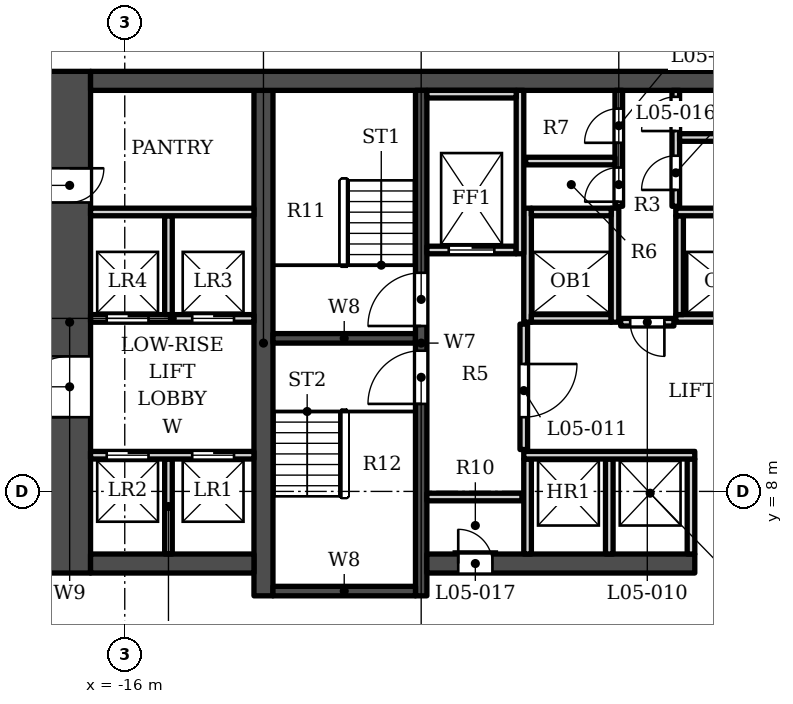
"""IFC4 building model, lengths in metres.
Left out: names, types, materials, properties, quantities, classifications, styles, units other than length and angle.
Written with IfcOpenShell. Run it as: python <this file> out.ifc"""

import sys

from ifc_helpers import new_model, si_unit, direction, frame, frame_2d, origin, place, context, subcontext, project, spatial, rectangle, extrude, element, fill, save


model = new_model("IFC4")
c1 = context("Model", 3, precision=1e-05, world=origin(), true_north=direction((0.0, 1.0)))
c2 = subcontext(c1, "Body", "Model", "MODEL_VIEW")
j1 = project(units=[si_unit("LENGTHUNIT", "METRE"), si_unit("PLANEANGLEUNIT", "RADIAN")], contexts=[c1])
p1 = place(None, origin())
s1 = spatial("IfcSite", under=j1, at=p1, CompositionType="ELEMENT")
p2 = place(p1, origin())
s2 = spatial("IfcBuilding", under=s1, at=p2, CompositionType="ELEMENT")
p3 = place(p2, frame((0.0, 0.0, 40.0)))
s3 = spatial("IfcBuildingStorey", under=s2, at=p3, CompositionType="ELEMENT", Elevation=40.0)
p4 = place(p3, frame((-16.9, 18.802, 0.0), z_axis=(0.0, 0.0, 1.0), x_axis=(1.0, 0.0, 0.0)))
e1 = element("IfcWall", 1, at=p4, inside=s3, PredefinedType="SHEAR", context=c2, shape_type="SweptSolid", body=[
    extrude(rectangle(XDim=33.8, YDim=0.5, at=frame_2d((16.9, 0.0))), origin(), (0.0, 0.0, 1.0), 6.0),
])
p5 = place(p3, frame((-12.35, 5.253, 0.0), z_axis=(0.0, 0.0, 1.0), x_axis=(0.0, 1.0, 0.0)))
e2 = element("IfcWall", 2, at=p5, inside=s3, PredefinedType="SHEAR", context=c2, shape_type="SweptSolid", body=[
    extrude(rectangle(XDim=13.3, YDim=0.5, at=frame_2d((6.65, 0.0))), origin(), (0.0, 0.0, 1.0), 6.0),
])
p6 = place(p3, frame((-8.2, 5.253, 0.0), z_axis=(0.0, 0.0, 1.0), x_axis=(0.0, 1.0, 0.0)))
e3 = element("IfcWall", 3, at=p6, inside=s3, PredefinedType="SHEAR", context=c2, shape_type="SweptSolid", body=[
    extrude(rectangle(XDim=13.3, YDim=0.3, at=frame_2d((6.65, 0.0))), origin(), (0.0, 0.0, 1.0), 6.0),
])
p7 = place(p6, frame((7.1, 0.0, 0.0)))
e4 = element("IfcOpeningElement", 4, at=p7, cuts=e3, PredefinedType="OPENING", context=c2, shape_type="SweptSolid", body=[
    extrude(rectangle(XDim=1.4, YDim=2.1, at=frame_2d((0.7, 1.05))), frame((0.0, 0.16, 0.0), z_axis=(0.0, -1.0, 0.0), x_axis=(1.0, 0.0, 0.0)), (0.0, 0.0, 1.0), 0.32),
])
p8 = place(p6, frame((5.05, 0.0, 0.0)))
e5 = element("IfcOpeningElement", 5, at=p8, cuts=e3, PredefinedType="OPENING", context=c2, shape_type="SweptSolid", body=[
    extrude(rectangle(XDim=1.4, YDim=2.1, at=frame_2d((0.7, 1.05))), frame((0.0, 0.16, 0.0), z_axis=(0.0, -1.0, 0.0), x_axis=(1.0, 0.0, 0.0)), (0.0, 0.0, 1.0), 0.32),
])
for number, where, z_axis, x_axis in (
    (6, (-12.1, 12.028, 0.0), (0.0, 0.0, 1.0), (1.0, 0.0, 0.0)),
    (7, (-12.1, 5.378, 0.0), (0.0, 0.0, 1.0), (1.0, 0.0, 0.0)),
):
    element("IfcWall", number, at=place(p3, frame(where, z_axis=z_axis, x_axis=x_axis)), inside=s3, PredefinedType="SHEAR", context=c2, shape_type="SweptSolid", body=[
        extrude(rectangle(XDim=3.75, YDim=0.25, at=frame_2d((1.875, 0.0))), origin(), (0.0, 0.0, 1.0), 6.0),
    ])
p9 = place(p3, frame((-8.05, 6.103, 0.0), z_axis=(0.0, 0.0, 1.0), x_axis=(1.0, 0.0, 0.0)))
e8 = element("IfcWall", 8, at=p9, inside=s3, PredefinedType="SHEAR", context=c2, shape_type="SweptSolid", body=[
    extrude(rectangle(XDim=7.05, YDim=0.5, at=frame_2d((3.525, 0.0))), origin(), (0.0, 0.0, 1.0), 6.0),
])
p10 = place(p9, frame((0.825, 0.0, 0.0)))
e9 = element("IfcOpeningElement", 9, at=p10, cuts=e8, PredefinedType="OPENING", context=c2, shape_type="SweptSolid", body=[
    extrude(rectangle(XDim=0.9, YDim=2.1, at=frame_2d((0.45, 1.05))), frame((0.0, 0.26, 0.0), z_axis=(0.0, -1.0, 0.0), x_axis=(1.0, 0.0, 0.0)), (0.0, 0.0, 1.0), 0.52),
])
p11 = place(p3, frame((-12.6, 6.103, 0.0), z_axis=(0.0, 0.0, 1.0), x_axis=(-1.0, 0.0, 0.0)))
e10 = element("IfcWall", 10, at=p11, inside=s3, PredefinedType="SHEAR", context=c2, shape_type="SweptSolid", body=[
    extrude(rectangle(XDim=4.3, YDim=0.5, at=frame_2d((2.15, 0.0))), origin(), (0.0, 0.0, 1.0), 6.0),
])
p12 = place(p3, frame((-17.45, 5.853, 0.0), z_axis=(0.0, 0.0, 1.0), x_axis=(0.0, 1.0, 0.0)))
e11 = element("IfcWall", 11, at=p12, inside=s3, PredefinedType="SHEAR", context=c2, shape_type="SweptSolid", body=[
    extrude(rectangle(XDim=13.2, YDim=1.1, at=frame_2d((6.6, 0.0))), origin(), (0.0, 0.0, 1.0), 6.0),
])
p13 = place(p12, frame((4.1, 0.0, 0.0)))
e12 = element("IfcOpeningElement", 12, at=p13, cuts=e11, PredefinedType="OPENING", context=c2, shape_type="SweptSolid", body=[
    extrude(rectangle(XDim=1.6, YDim=2.1, at=frame_2d((0.8, 1.05))), frame((0.0, 0.56, 0.0), z_axis=(0.0, -1.0, 0.0), x_axis=(1.0, 0.0, 0.0)), (0.0, 0.0, 1.0), 1.12),
])
p14 = place(p12, frame((9.75, 0.0, 0.0)))
e13 = element("IfcOpeningElement", 13, at=p14, cuts=e11, PredefinedType="OPENING", context=c2, shape_type="SweptSolid", body=[
    extrude(rectangle(XDim=0.9, YDim=2.1, at=frame_2d((0.45, 1.05))), frame((0.0, 0.56, 0.0), z_axis=(0.0, -1.0, 0.0), x_axis=(1.0, 0.0, 0.0)), (0.0, 0.0, 1.0), 1.12),
])
for number, where, z_axis, x_axis in (
    (14, (-14.85, 6.353, 0.0), (0.0, 0.0, 1.0), (0.0, 1.0, 0.0)),
    (15, (-5.4, 6.353, 0.0), (0.0, 0.0, 1.0), (0.0, 1.0, 0.0)),
    (16, (-3.25, 6.353, 0.0), (0.0, 0.0, 1.0), (0.0, 1.0, 0.0)),
    (17, (-1.1, 6.353, 0.0), (0.0, 0.0, 1.0), (0.0, 1.0, 0.0)),
    (18, (-8.05, 7.853, 0.0), (0.0, 0.0, 1.0), (1.0, 0.0, 0.0)),
):
    element("IfcWall", number, at=place(p3, frame(where, z_axis=z_axis, x_axis=x_axis)), inside=s3, PredefinedType="SOLIDWALL", context=c2, shape_type="SweptSolid", body=[
        extrude(rectangle(XDim=2.5, YDim=0.2, at=frame_2d((1.25, 0.0))), origin(), (0.0, 0.0, 1.0), 5.55),
    ])
p15 = place(p3, frame((-16.9, 8.953, 0.0), z_axis=(0.0, 0.0, 1.0), x_axis=(1.0, 0.0, 0.0)))
e19 = element("IfcWall", 19, at=p15, inside=s3, PredefinedType="SOLIDWALL", context=c2, shape_type="SweptSolid", body=[
    extrude(rectangle(XDim=4.3, YDim=0.2, at=frame_2d((2.15, 0.0))), origin(), (0.0, 0.0, 1.0), 5.55),
])
p16 = place(p15, frame((2.675, 0.0, 0.0)))
e20 = element("IfcOpeningElement", 20, at=p16, cuts=e19, PredefinedType="OPENING", context=c2, shape_type="SweptSolid", body=[
    extrude(rectangle(XDim=1.1, YDim=2.1, at=frame_2d((0.55, 1.05))), frame((0.0, 0.11, 0.0), z_axis=(0.0, -1.0, 0.0), x_axis=(1.0, 0.0, 0.0)), (0.0, 0.0, 1.0), 0.22),
])
p17 = place(p15, frame((0.425, 0.0, 0.0)))
e21 = element("IfcOpeningElement", 21, at=p17, cuts=e19, PredefinedType="OPENING", context=c2, shape_type="SweptSolid", body=[
    extrude(rectangle(XDim=1.1, YDim=2.1, at=frame_2d((0.55, 1.05))), frame((0.0, 0.11, 0.0), z_axis=(0.0, -1.0, 0.0), x_axis=(1.0, 0.0, 0.0)), (0.0, 0.0, 1.0), 0.22),
])
p18 = place(p3, frame((-5.5, 8.953, 0.0), z_axis=(0.0, 0.0, 1.0), x_axis=(1.0, 0.0, 0.0)))
e22 = element("IfcWall", 22, at=p18, inside=s3, PredefinedType="SOLIDWALL", context=c2, shape_type="SweptSolid", body=[
    extrude(rectangle(XDim=4.5, YDim=0.2, at=frame_2d((2.25, 0.0))), origin(), (0.0, 0.0, 1.0), 5.55),
])
p19 = place(p3, frame((-5.5, 9.103, 0.0), z_axis=(0.0, 0.0, 1.0), x_axis=(0.0, 1.0, 0.0)))
e23 = element("IfcWall", 23, at=p19, inside=s3, PredefinedType="SOLIDWALL", context=c2, shape_type="SweptSolid", body=[
    extrude(rectangle(XDim=3.3, YDim=0.2, at=frame_2d((1.65, 0.0))), origin(), (0.0, 0.0, 1.0), 5.55),
])
p20 = place(p19, frame((0.85, 0.0, 0.0)))
e24 = element("IfcOpeningElement", 24, at=p20, cuts=e23, PredefinedType="OPENING", context=c2, shape_type="SweptSolid", body=[
    extrude(rectangle(XDim=1.4, YDim=2.1, at=frame_2d((0.7, 1.05))), frame((0.0, 0.11, 0.0), z_axis=(0.0, -1.0, 0.0), x_axis=(1.0, 0.0, 0.0)), (0.0, 0.0, 1.0), 0.22),
])
p21 = place(p3, frame((-2.95, 12.453, 0.0), z_axis=(0.0, 0.0, 1.0), x_axis=(1.0, 0.0, 0.0)))
e25 = element("IfcWall", 25, at=p21, inside=s3, PredefinedType="SOLIDWALL", context=c2, shape_type="SweptSolid", body=[
    extrude(rectangle(XDim=1.4, YDim=0.2, at=frame_2d((0.7, 0.0))), origin(), (0.0, 0.0, 1.0), 5.55),
])
p22 = place(p21, frame((0.25, 0.0, 0.0)))
e26 = element("IfcOpeningElement", 26, at=p22, cuts=e25, PredefinedType="OPENING", context=c2, shape_type="SweptSolid", body=[
    extrude(rectangle(XDim=0.9, YDim=2.1, at=frame_2d((0.45, 1.05))), frame((0.0, 0.11, 0.0), z_axis=(0.0, -1.0, 0.0), x_axis=(1.0, 0.0, 0.0)), (0.0, 0.0, 1.0), 0.22),
])
p23 = place(p3, frame((-16.9, 12.552, 0.0), z_axis=(0.0, 0.0, 1.0), x_axis=(1.0, 0.0, 0.0)))
e27 = element("IfcWall", 27, at=p23, inside=s3, PredefinedType="SOLIDWALL", context=c2, shape_type="SweptSolid", body=[
    extrude(rectangle(XDim=4.3, YDim=0.2, at=frame_2d((2.15, 0.0))), origin(), (0.0, 0.0, 1.0), 5.55),
])
p24 = place(p23, frame((2.675, 0.0, 0.0)))
e28 = element("IfcOpeningElement", 28, at=p24, cuts=e27, PredefinedType="OPENING", context=c2, shape_type="SweptSolid", body=[
    extrude(rectangle(XDim=1.1, YDim=2.1, at=frame_2d((0.55, 1.05))), frame((0.0, 0.11, 0.0), z_axis=(0.0, -1.0, 0.0), x_axis=(1.0, 0.0, 0.0)), (0.0, 0.0, 1.0), 0.22),
])
p25 = place(p23, frame((0.425, 0.0, 0.0)))
e29 = element("IfcOpeningElement", 29, at=p25, cuts=e27, PredefinedType="OPENING", context=c2, shape_type="SweptSolid", body=[
    extrude(rectangle(XDim=1.1, YDim=2.1, at=frame_2d((0.55, 1.05))), frame((0.0, 0.11, 0.0), z_axis=(0.0, -1.0, 0.0), x_axis=(1.0, 0.0, 0.0)), (0.0, 0.0, 1.0), 0.22),
])
p26 = place(p3, frame((-5.4, 12.453, 0.0), z_axis=(0.0, 0.0, 1.0), x_axis=(0.0, 1.0, 0.0)))
e30 = element("IfcWall", 30, at=p26, inside=s3, PredefinedType="SOLIDWALL", context=c2, shape_type="SweptSolid", body=[
    extrude(rectangle(XDim=3.0, YDim=0.2, at=frame_2d((1.5, 0.0))), origin(), (0.0, 0.0, 1.0), 5.55),
])
p27 = place(p3, frame((-5.3, 12.552, 0.0), z_axis=(0.0, 0.0, 1.0), x_axis=(1.0, 0.0, 0.0)))
e31 = element("IfcWall", 31, at=p27, inside=s3, PredefinedType="SOLIDWALL", context=c2, shape_type="SweptSolid", body=[
    extrude(rectangle(XDim=2.1, YDim=0.2, at=frame_2d((1.05, 0.0))), origin(), (0.0, 0.0, 1.0), 5.55),
])
p28 = place(p3, frame((-3.1, 12.453, 0.0), z_axis=(0.0, 0.0, 1.0), x_axis=(0.0, 1.0, 0.0)))
e32 = element("IfcWall", 32, at=p28, inside=s3, PredefinedType="SOLIDWALL", context=c2, shape_type="SweptSolid", body=[
    extrude(rectangle(XDim=3.0, YDim=0.2, at=frame_2d((1.5, 0.0))), origin(), (0.0, 0.0, 1.0), 5.55),
])
p29 = place(p3, frame((-1.5, 12.552, 0.0), z_axis=(0.0, 0.0, 1.0), x_axis=(1.0, 0.0, 0.0)))
e33 = element("IfcWall", 33, at=p29, inside=s3, PredefinedType="SOLIDWALL", context=c2, shape_type="SweptSolid", body=[
    extrude(rectangle(XDim=7.0, YDim=0.2, at=frame_2d((3.5, 0.0))), origin(), (0.0, 0.0, 1.0), 5.55),
])
for number, where, z_axis, x_axis in (
    (34, (-14.85, 12.653, 0.0), (0.0, 0.0, 1.0), (0.0, 1.0, 0.0)),
    (35, (-1.4, 12.653, 0.0), (0.0, 0.0, 1.0), (0.0, 1.0, 0.0)),
):
    element("IfcWall", number, at=place(p3, frame(where, z_axis=z_axis, x_axis=x_axis)), inside=s3, PredefinedType="SOLIDWALL", context=c2, shape_type="SweptSolid", body=[
        extrude(rectangle(XDim=2.6, YDim=0.2, at=frame_2d((1.3, 0.0))), origin(), (0.0, 0.0, 1.0), 5.55),
    ])
p30 = place(p3, frame((-8.05, 14.353, 0.0), z_axis=(0.0, 0.0, 1.0), x_axis=(1.0, 0.0, 0.0)))
e36 = element("IfcWall", 36, at=p30, inside=s3, PredefinedType="SOLIDWALL", context=c2, shape_type="SweptSolid", body=[
    extrude(rectangle(XDim=2.35, YDim=0.2, at=frame_2d((1.175, 0.0))), origin(), (0.0, 0.0, 1.0), 5.55),
])
p31 = place(p30, frame((0.575, 0.0, 0.0)))
e37 = element("IfcOpeningElement", 37, at=p31, cuts=e36, PredefinedType="OPENING", context=c2, shape_type="SweptSolid", body=[
    extrude(rectangle(XDim=1.2, YDim=2.1, at=frame_2d((0.6, 1.05))), frame((0.0, 0.11, 0.0), z_axis=(0.0, -1.0, 0.0), x_axis=(1.0, 0.0, 0.0)), (0.0, 0.0, 1.0), 0.22),
])
for number, where, z_axis, x_axis in (
    (38, (-5.6, 14.253, 0.0), (0.0, 0.0, 1.0), (0.0, 1.0, 0.0)),
    (39, (-16.9, 15.353, 0.0), (0.0, 0.0, 1.0), (1.0, 0.0, 0.0)),
):
    element("IfcWall", number, at=place(p3, frame(where, z_axis=z_axis, x_axis=x_axis)), inside=s3, PredefinedType="SOLIDWALL", context=c2, shape_type="SweptSolid", body=[
        extrude(rectangle(XDim=4.3, YDim=0.2, at=frame_2d((2.15, 0.0))), origin(), (0.0, 0.0, 1.0), 5.55),
    ])
p32 = place(p3, frame((-5.3, 15.353, 0.0), z_axis=(0.0, 0.0, 1.0), x_axis=(1.0, 0.0, 0.0)))
e40 = element("IfcWall", 40, at=p32, inside=s3, PredefinedType="SOLIDWALL", context=c2, shape_type="SweptSolid", body=[
    extrude(rectangle(XDim=2.1, YDim=0.2, at=frame_2d((1.05, 0.0))), origin(), (0.0, 0.0, 1.0), 5.55),
])
p33 = place(p3, frame((-1.5, 15.353, 0.0), z_axis=(0.0, 0.0, 1.0), x_axis=(1.0, 0.0, 0.0)))
e41 = element("IfcWall", 41, at=p33, inside=s3, PredefinedType="SOLIDWALL", context=c2, shape_type="SweptSolid", body=[
    extrude(rectangle(XDim=7.2, YDim=0.2, at=frame_2d((3.6, 0.0))), origin(), (0.0, 0.0, 1.0), 5.55),
])
p34 = place(p3, frame((-3.0, 15.503, 0.0), z_axis=(0.0, 0.0, 1.0), x_axis=(0.0, 1.0, 0.0)))
e42 = element("IfcWall", 42, at=p34, inside=s3, PredefinedType="SOLIDWALL", context=c2, shape_type="SweptSolid", body=[
    extrude(rectangle(XDim=3.05, YDim=0.2, at=frame_2d((1.525, 0.0))), origin(), (0.0, 0.0, 1.0), 5.55),
])
p35 = place(p34, frame((0.12, 0.0, 0.0)))
e43 = element("IfcOpeningElement", 43, at=p35, cuts=e42, PredefinedType="OPENING", context=c2, shape_type="SweptSolid", body=[
    extrude(rectangle(XDim=0.9, YDim=2.1, at=frame_2d((0.45, 1.05))), frame((0.0, 0.11, 0.0), z_axis=(0.0, -1.0, 0.0), x_axis=(1.0, 0.0, 0.0)), (0.0, 0.0, 1.0), 0.22),
])
p36 = place(p34, frame((1.67, 0.0, 0.0)))
e44 = element("IfcOpeningElement", 44, at=p36, cuts=e42, PredefinedType="OPENING", context=c2, shape_type="SweptSolid", body=[
    extrude(rectangle(XDim=0.9, YDim=2.1, at=frame_2d((0.45, 1.05))), frame((0.0, 0.11, 0.0), z_axis=(0.0, -1.0, 0.0), x_axis=(1.0, 0.0, 0.0)), (0.0, 0.0, 1.0), 0.22),
])
p37 = place(p3, frame((-1.5, 15.503, 0.0), z_axis=(0.0, 0.0, 1.0), x_axis=(0.0, 1.0, 0.0)))
e45 = element("IfcWall", 45, at=p37, inside=s3, PredefinedType="SOLIDWALL", context=c2, shape_type="SweptSolid", body=[
    extrude(rectangle(XDim=3.05, YDim=0.2, at=frame_2d((1.525, 0.0))), origin(), (0.0, 0.0, 1.0), 5.55),
])
p38 = place(p37, frame((0.43, 0.0, 0.0)))
e46 = element("IfcOpeningElement", 46, at=p38, cuts=e45, PredefinedType="OPENING", context=c2, shape_type="SweptSolid", body=[
    extrude(rectangle(XDim=0.9, YDim=2.1, at=frame_2d((0.45, 1.05))), frame((0.0, 0.11, 0.0), z_axis=(0.0, -1.0, 0.0), x_axis=(1.0, 0.0, 0.0)), (0.0, 0.0, 1.0), 0.22),
])
p39 = place(p37, frame((1.98, 0.0, 0.0)))
e47 = element("IfcOpeningElement", 47, at=p39, cuts=e45, PredefinedType="OPENING", context=c2, shape_type="SweptSolid", body=[
    extrude(rectangle(XDim=0.9, YDim=2.1, at=frame_2d((0.45, 1.05))), frame((0.0, 0.11, 0.0), z_axis=(0.0, -1.0, 0.0), x_axis=(1.0, 0.0, 0.0)), (0.0, 0.0, 1.0), 0.22),
])
p40 = place(p3, frame((-5.45, 16.693, 0.0), z_axis=(0.0, 0.0, 1.0), x_axis=(1.0, 0.0, 0.0)))
e48 = element("IfcWall", 48, at=p40, inside=s3, PredefinedType="SOLIDWALL", context=c2, shape_type="SweptSolid", body=[
    extrude(rectangle(XDim=2.35, YDim=0.2, at=frame_2d((1.175, 0.0))), origin(), (0.0, 0.0, 1.0), 5.55),
])
p41 = place(p3, frame((-1.4, 17.312, 0.0), z_axis=(0.0, 0.0, 1.0), x_axis=(1.0, 0.0, 0.0)))
e49 = element("IfcWall", 49, at=p41, inside=s3, PredefinedType="SOLIDWALL", context=c2, shape_type="SweptSolid", body=[
    extrude(rectangle(XDim=6.85, YDim=0.2, at=frame_2d((3.425, 0.0))), origin(), (0.0, 0.0, 1.0), 5.55),
])
p42 = place(p3, frame((-8.05, 18.453, 0.0), z_axis=(0.0, 0.0, 1.0), x_axis=(1.0, 0.0, 0.0)))
e50 = element("IfcWall", 50, at=p42, inside=s3, PredefinedType="SOLIDWALL", context=c2, shape_type="SweptSolid", body=[
    extrude(rectangle(XDim=2.35, YDim=0.2, at=frame_2d((1.175, 0.0))), origin(), (0.0, 0.0, 1.0), 5.55),
])
p43 = place(p31, origin())
e51 = element("IfcDoor", 51, at=p43, inside=s3, OperationType="DOUBLE_DOOR_SLIDING", PredefinedType="DOOR", context=c2, shape_type="SweptSolid", body=[
    extrude(rectangle(XDim=1.2, YDim=2.1, at=frame_2d((0.6, 1.05))), frame((0.0, 0.025, 0.0), z_axis=(0.0, -1.0, 0.0), x_axis=(1.0, 0.0, 0.0)), (0.0, 0.0, 1.0), 0.05),
])
fill(e37, e51)
p44 = place(p16, origin())
e52 = element("IfcDoor", 52, at=p44, inside=s3, OperationType="DOUBLE_DOOR_SLIDING", PredefinedType="DOOR", context=c2, shape_type="SweptSolid", body=[
    extrude(rectangle(XDim=1.1, YDim=2.1, at=frame_2d((0.55, 1.05))), frame((0.0, 0.025, 0.0), z_axis=(0.0, -1.0, 0.0), x_axis=(1.0, 0.0, 0.0)), (0.0, 0.0, 1.0), 0.05),
])
fill(e20, e52)
p45 = place(p24, origin())
e53 = element("IfcDoor", 53, at=p45, inside=s3, OperationType="DOUBLE_DOOR_SLIDING", PredefinedType="DOOR", context=c2, shape_type="SweptSolid", body=[
    extrude(rectangle(XDim=1.1, YDim=2.1, at=frame_2d((0.55, 1.05))), frame((0.0, 0.025, 0.0), z_axis=(0.0, -1.0, 0.0), x_axis=(1.0, 0.0, 0.0)), (0.0, 0.0, 1.0), 0.05),
])
fill(e28, e53)
p46 = place(p17, origin())
e54 = element("IfcDoor", 54, at=p46, inside=s3, OperationType="DOUBLE_DOOR_SLIDING", PredefinedType="DOOR", context=c2, shape_type="SweptSolid", body=[
    extrude(rectangle(XDim=1.1, YDim=2.1, at=frame_2d((0.55, 1.05))), frame((0.0, 0.025, 0.0), z_axis=(0.0, -1.0, 0.0), x_axis=(1.0, 0.0, 0.0)), (0.0, 0.0, 1.0), 0.05),
])
fill(e21, e54)
p47 = place(p25, origin())
e55 = element("IfcDoor", 55, at=p47, inside=s3, OperationType="DOUBLE_DOOR_SLIDING", PredefinedType="DOOR", context=c2, shape_type="SweptSolid", body=[
    extrude(rectangle(XDim=1.1, YDim=2.1, at=frame_2d((0.55, 1.05))), frame((0.0, 0.025, 0.0), z_axis=(0.0, -1.0, 0.0), x_axis=(1.0, 0.0, 0.0)), (0.0, 0.0, 1.0), 0.05),
])
fill(e29, e55)
p48 = place(p7, origin())
e56 = element("IfcDoor", 56, at=p48, inside=s3, OperationType="SINGLE_SWING_LEFT", PredefinedType="DOOR", context=c2, shape_type="SweptSolid", body=[
    extrude(rectangle(XDim=1.4, YDim=2.1, at=frame_2d((0.7, 1.05))), frame((0.0, 0.025, 0.0), z_axis=(0.0, -1.0, 0.0), x_axis=(1.0, 0.0, 0.0)), (0.0, 0.0, 1.0), 0.05),
])
fill(e4, e56)
p49 = place(p8, origin())
e57 = element("IfcDoor", 57, at=p49, inside=s3, OperationType="SINGLE_SWING_LEFT", PredefinedType="DOOR", context=c2, shape_type="SweptSolid", body=[
    extrude(rectangle(XDim=1.4, YDim=2.1, at=frame_2d((0.7, 1.05))), frame((0.0, 0.025, 0.0), z_axis=(0.0, -1.0, 0.0), x_axis=(1.0, 0.0, 0.0)), (0.0, 0.0, 1.0), 0.05),
])
fill(e5, e57)
p50 = place(p22, origin())
e58 = element("IfcDoor", 58, at=p50, inside=s3, OperationType="SINGLE_SWING_RIGHT", PredefinedType="DOOR", context=c2, shape_type="SweptSolid", body=[
    extrude(rectangle(XDim=0.9, YDim=2.1, at=frame_2d((0.45, 1.05))), frame((0.0, 0.025, 0.0), z_axis=(0.0, -1.0, 0.0), x_axis=(1.0, 0.0, 0.0)), (0.0, 0.0, 1.0), 0.05),
])
fill(e26, e58)
p51 = place(p20, origin())
e59 = element("IfcDoor", 59, at=p51, inside=s3, OperationType="SINGLE_SWING_RIGHT", PredefinedType="DOOR", context=c2, shape_type="SweptSolid", body=[
    extrude(rectangle(XDim=1.4, YDim=2.1, at=frame_2d((0.7, 1.05))), frame((0.0, 0.025, 0.0), z_axis=(0.0, -1.0, 0.0), x_axis=(1.0, 0.0, 0.0)), (0.0, 0.0, 1.0), 0.05),
])
fill(e24, e59)
p52 = place(p35, origin())
e60 = element("IfcDoor", 60, at=p52, inside=s3, OperationType="SINGLE_SWING_LEFT", PredefinedType="DOOR", context=c2, shape_type="SweptSolid", body=[
    extrude(rectangle(XDim=0.9, YDim=2.1, at=frame_2d((0.45, 1.05))), frame((0.0, 0.025, 0.0), z_axis=(0.0, -1.0, 0.0), x_axis=(1.0, 0.0, 0.0)), (0.0, 0.0, 1.0), 0.05),
])
fill(e43, e60)
p53 = place(p36, origin())
e61 = element("IfcDoor", 61, at=p53, inside=s3, OperationType="SINGLE_SWING_LEFT", PredefinedType="DOOR", context=c2, shape_type="SweptSolid", body=[
    extrude(rectangle(XDim=0.9, YDim=2.1, at=frame_2d((0.45, 1.05))), frame((0.0, 0.025, 0.0), z_axis=(0.0, -1.0, 0.0), x_axis=(1.0, 0.0, 0.0)), (0.0, 0.0, 1.0), 0.05),
])
fill(e44, e61)
p54 = place(p38, origin())
e62 = element("IfcDoor", 62, at=p54, inside=s3, OperationType="SINGLE_SWING_LEFT", PredefinedType="DOOR", context=c2, shape_type="SweptSolid", body=[
    extrude(rectangle(XDim=0.9, YDim=2.1, at=frame_2d((0.45, 1.05))), frame((0.0, 0.025, 0.0), z_axis=(0.0, -1.0, 0.0), x_axis=(1.0, 0.0, 0.0)), (0.0, 0.0, 1.0), 0.05),
])
fill(e46, e62)
p55 = place(p39, origin())
e63 = element("IfcDoor", 63, at=p55, inside=s3, OperationType="SINGLE_SWING_LEFT", PredefinedType="DOOR", context=c2, shape_type="SweptSolid", body=[
    extrude(rectangle(XDim=0.9, YDim=2.1, at=frame_2d((0.45, 1.05))), frame((0.0, 0.025, 0.0), z_axis=(0.0, -1.0, 0.0), x_axis=(1.0, 0.0, 0.0)), (0.0, 0.0, 1.0), 0.05),
])
fill(e47, e63)
p56 = place(p10, origin())
e64 = element("IfcDoor", 64, at=p56, inside=s3, OperationType="SINGLE_SWING_LEFT", PredefinedType="DOOR", context=c2, shape_type="SweptSolid", body=[
    extrude(rectangle(XDim=0.9, YDim=2.1, at=frame_2d((0.45, 1.05))), frame((0.0, 0.025, 0.0), z_axis=(0.0, -1.0, 0.0), x_axis=(1.0, 0.0, 0.0)), (0.0, 0.0, 1.0), 0.05),
])
fill(e9, e64)
p57 = place(p13, origin())
e65 = element("IfcDoor", 65, at=p57, inside=s3, OperationType="DOUBLE_DOOR_SINGLE_SWING", PredefinedType="DOOR", context=c2, shape_type="SweptSolid", body=[
    extrude(rectangle(XDim=1.6, YDim=2.1, at=frame_2d((0.8, 1.05))), frame((0.0, -0.225, 0.0), z_axis=(0.0, -1.0, 0.0), x_axis=(1.0, 0.0, 0.0)), (0.0, 0.0, 1.0), 0.05),
])
fill(e12, e65)
p58 = place(p14, origin())
e66 = element("IfcDoor", 66, at=p58, inside=s3, OperationType="SINGLE_SWING_RIGHT", PredefinedType="DOOR", context=c2, shape_type="SweptSolid", body=[
    extrude(rectangle(XDim=0.9, YDim=2.1, at=frame_2d((0.45, 1.05))), frame((0.0, -0.225, 0.0), z_axis=(0.0, -1.0, 0.0), x_axis=(1.0, 0.0, 0.0)), (0.0, 0.0, 1.0), 0.05),
])
fill(e13, e66)
save(model, sys.argv[1])
